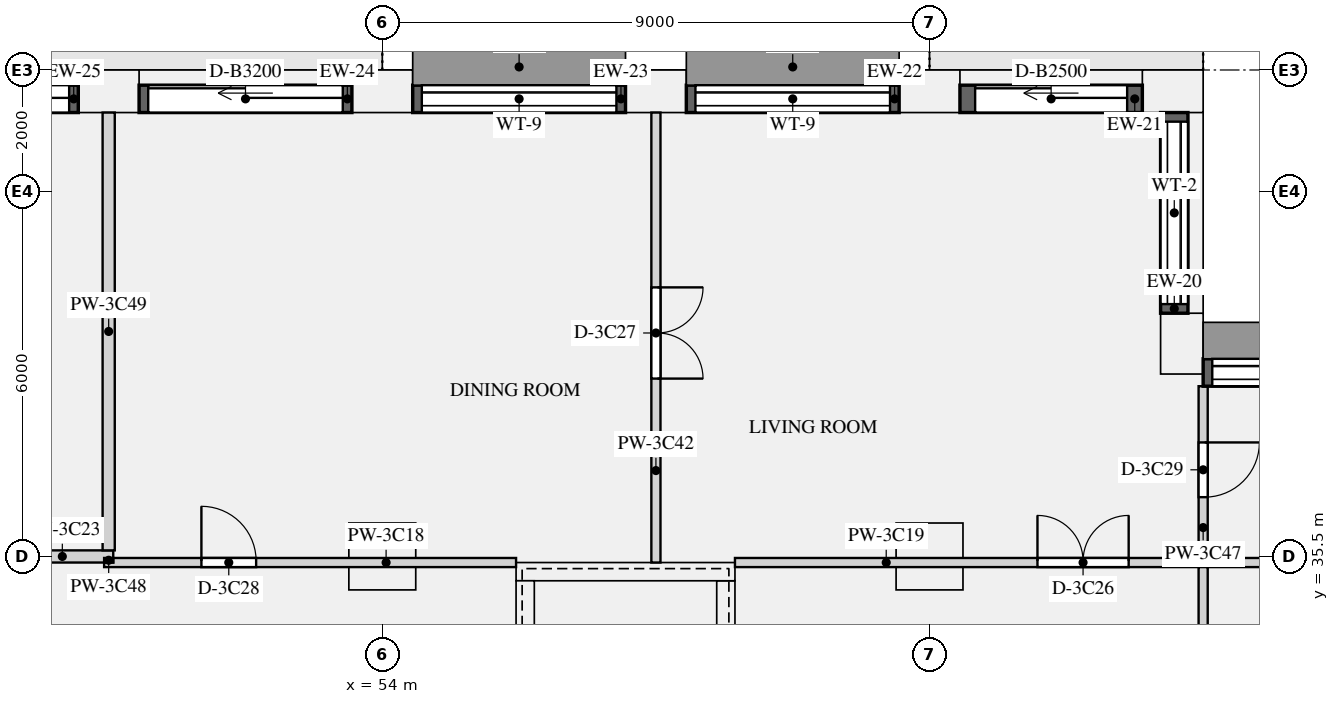
"""IFC4 building model, lengths in metres.
Left out: names, types, materials, properties, quantities, classifications, styles, units other than length and angle.
Written with IfcOpenShell. Run it as: python <this file> out.ifc"""

import sys

from ifc_helpers import new_model, si_unit, direction, frame, frame_2d, origin, origin_2d, place, context, subcontext, project, spatial, rectangle, extrude, element, fill, save


model = new_model("IFC4")
c1 = context("Model", 3, precision=1e-05, world=origin(), true_north=direction((0.0, 1.0)))
c2 = subcontext(c1, "Body", "Model", "MODEL_VIEW")
j1 = project(units=[si_unit("LENGTHUNIT", "METRE"), si_unit("PLANEANGLEUNIT", "RADIAN")], contexts=[c1])
p1 = place(None, origin())
s1 = spatial("IfcSite", under=j1, at=p1, CompositionType="ELEMENT")
p2 = place(p1, origin())
s2 = spatial("IfcBuilding", under=s1, at=p2, CompositionType="ELEMENT")
p3 = place(p2, frame((0.0, 0.0, 160.2)))
s3 = spatial("IfcBuildingStorey", under=s2, at=p3, CompositionType="ELEMENT", Elevation=160.2)
for number, where, z_axis, x_axis in (
    (1, (67.15, 39.0, 0.0), (0.0, 0.0, 1.0), (0.0, 1.0, 0.0)),
    (2, (67.0, 43.15, 0.0), (0.0, 0.0, 1.0), (-1.0, 0.0, 0.0)),
    (3, (63.0, 43.15, 0.0), (0.0, 0.0, 1.0), (-1.0, 0.0, 0.0)),
    (4, (58.5, 43.15, 0.0), (0.0, 0.0, 1.0), (-1.0, 0.0, 0.0)),
    (5, (54.0, 43.15, 0.0), (0.0, 0.0, 1.0), (-1.0, 0.0, 0.0)),
    (6, (49.5, 43.15, 0.0), (0.0, 0.0, 1.0), (-1.0, 0.0, 0.0)),
):
    element("IfcColumn", number, at=place(p3, frame(where, z_axis=z_axis, x_axis=x_axis)), inside=s3, PredefinedType="USERDEFINED", context=c2, shape_type="SweptSolid", body=[
        extrude(rectangle(XDim=1.0, YDim=0.7, at=origin_2d()), origin(), (0.0, 0.0, 1.0), 3.15),
    ])
for number, where, z_axis, x_axis in (
    (7, (54.0, 35.5, 0.0), (0.0, 0.0, 1.0), (1.0, 0.0, 0.0)),
    (8, (63.0, 35.5, 0.0), (0.0, 0.0, 1.0), (1.0, 0.0, 0.0)),
):
    element("IfcColumn", number, at=place(p3, frame(where, z_axis=z_axis, x_axis=x_axis)), inside=s3, PredefinedType="COLUMN", context=c2, shape_type="SweptSolid", body=[
        extrude(rectangle(XDim=1.1, YDim=1.1, at=origin_2d()), origin(), (0.0, 0.0, 1.0), 3.15),
    ])
p4 = place(p3, frame((56.2, 35.25, 0.0), z_axis=(0.0, 0.0, 1.0), x_axis=(1.0, 0.0, 0.0)))
e9 = element("IfcWall", 9, at=p4, inside=s3, PredefinedType="SHEAR", context=c2, shape_type="SweptSolid", body=[
    extrude(rectangle(XDim=3.6, YDim=0.3, at=frame_2d((1.8, 0.0))), origin(), (0.0, 0.0, 1.0), 3.15),
])
for number, where, z_axis, x_axis in (
    (10, (56.35, 27.3, 0.0), (0.0, 0.0, 1.0), (0.0, 1.0, 0.0)),
    (11, (59.65, 27.3, 0.0), (0.0, 0.0, 1.0), (0.0, 1.0, 0.0)),
):
    element("IfcWall", number, at=place(p3, frame(where, z_axis=z_axis, x_axis=x_axis)), inside=s3, PredefinedType="SHEAR", context=c2, shape_type="SweptSolid", body=[
        extrude(rectangle(XDim=7.8, YDim=0.3, at=frame_2d((3.9, 0.0))), origin(), (0.0, 0.0, 1.0), 3.15),
    ])
p5 = place(p3, frame((71.0, 38.525, 0.9), z_axis=(0.0, 0.0, 1.0), x_axis=(-1.0, 0.0, 0.0)))
e12 = element("IfcWall", 12, at=p5, inside=s3, PredefinedType="SOLIDWALL", context=c2, shape_type="SweptSolid", body=[
    extrude(rectangle(XDim=3.5, YDim=0.45, at=frame_2d((1.75, 0.0))), origin(), (0.0, 0.0, 1.0), 1.93),
])
p6 = place(p5, frame((0.15, 0.0, 0.15)))
e13 = element("IfcOpeningElement", 13, at=p6, cuts=e12, PredefinedType="OPENING", context=c2, shape_type="SweptSolid", body=[
    extrude(rectangle(XDim=3.2, YDim=1.5, at=frame_2d((1.6, 0.75))), frame((0.0, 0.235, 0.0), z_axis=(0.0, -1.0, 0.0), x_axis=(1.0, 0.0, 0.0)), (0.0, 0.0, 1.0), 0.47),
])
p7 = place(p3, frame((67.025, 39.5, 0.9), z_axis=(0.0, 0.0, 1.0), x_axis=(0.0, 1.0, 0.0)))
e14 = element("IfcWall", 14, at=p7, inside=s3, PredefinedType="SOLIDWALL", context=c2, shape_type="SweptSolid", body=[
    extrude(rectangle(XDim=3.3, YDim=0.45, at=frame_2d((1.65, 0.0))), origin(), (0.0, 0.0, 1.0), 1.93),
])
p8 = place(p7, frame((0.15, 0.0, 0.15)))
e15 = element("IfcOpeningElement", 15, at=p8, cuts=e14, PredefinedType="OPENING", context=c2, shape_type="SweptSolid", body=[
    extrude(rectangle(XDim=3.0, YDim=1.5, at=frame_2d((1.5, 0.75))), frame((0.0, 0.235, 0.0), z_axis=(0.0, -1.0, 0.0), x_axis=(1.0, 0.0, 0.0)), (0.0, 0.0, 1.0), 0.47),
])
p9 = place(p3, frame((66.5, 43.025, 0.0), z_axis=(0.0, 0.0, 1.0), x_axis=(-1.0, 0.0, 0.0)))
e16 = element("IfcWall", 16, at=p9, inside=s3, PredefinedType="SOLIDWALL", context=c2, shape_type="SweptSolid", body=[
    extrude(rectangle(XDim=3.0, YDim=0.45, at=frame_2d((1.5, 0.0))), origin(), (0.0, 0.0, 1.0), 2.83),
])
p10 = place(p9, frame((0.25, 0.0, 0.0)))
e17 = element("IfcOpeningElement", 17, at=p10, cuts=e16, PredefinedType="OPENING", context=c2, shape_type="SweptSolid", body=[
    extrude(rectangle(XDim=2.5, YDim=2.3, at=frame_2d((1.25, 1.15))), frame((0.0, 0.235, 0.0), z_axis=(0.0, -1.0, 0.0), x_axis=(1.0, 0.0, 0.0)), (0.0, 0.0, 1.0), 0.47),
])
p11 = place(p3, frame((62.5, 43.025, 0.9), z_axis=(0.0, 0.0, 1.0), x_axis=(-1.0, 0.0, 0.0)))
e18 = element("IfcWall", 18, at=p11, inside=s3, PredefinedType="SOLIDWALL", context=c2, shape_type="SweptSolid", body=[
    extrude(rectangle(XDim=3.5, YDim=0.45, at=frame_2d((1.75, 0.0))), origin(), (0.0, 0.0, 1.0), 1.93),
])
p12 = place(p11, frame((0.15, 0.0, 0.15)))
e19 = element("IfcOpeningElement", 19, at=p12, cuts=e18, PredefinedType="OPENING", context=c2, shape_type="SweptSolid", body=[
    extrude(rectangle(XDim=3.2, YDim=1.5, at=frame_2d((1.6, 0.75))), frame((0.0, 0.235, 0.0), z_axis=(0.0, -1.0, 0.0), x_axis=(1.0, 0.0, 0.0)), (0.0, 0.0, 1.0), 0.47),
])
p13 = place(p3, frame((58.0, 43.025, 0.9), z_axis=(0.0, 0.0, 1.0), x_axis=(-1.0, 0.0, 0.0)))
e20 = element("IfcWall", 20, at=p13, inside=s3, PredefinedType="SOLIDWALL", context=c2, shape_type="SweptSolid", body=[
    extrude(rectangle(XDim=3.5, YDim=0.45, at=frame_2d((1.75, 0.0))), origin(), (0.0, 0.0, 1.0), 1.93),
])
p14 = place(p13, frame((0.15, 0.0, 0.15)))
e21 = element("IfcOpeningElement", 21, at=p14, cuts=e20, PredefinedType="OPENING", context=c2, shape_type="SweptSolid", body=[
    extrude(rectangle(XDim=3.2, YDim=1.5, at=frame_2d((1.6, 0.75))), frame((0.0, 0.235, 0.0), z_axis=(0.0, -1.0, 0.0), x_axis=(1.0, 0.0, 0.0)), (0.0, 0.0, 1.0), 0.47),
])
p15 = place(p3, frame((53.5, 43.025, 0.0), z_axis=(0.0, 0.0, 1.0), x_axis=(-1.0, 0.0, 0.0)))
e22 = element("IfcWall", 22, at=p15, inside=s3, PredefinedType="SOLIDWALL", context=c2, shape_type="SweptSolid", body=[
    extrude(rectangle(XDim=3.5, YDim=0.45, at=frame_2d((1.75, 0.0))), origin(), (0.0, 0.0, 1.0), 2.83),
])
p16 = place(p15, frame((0.15, 0.0, 0.0)))
e23 = element("IfcOpeningElement", 23, at=p16, cuts=e22, PredefinedType="OPENING", context=c2, shape_type="SweptSolid", body=[
    extrude(rectangle(XDim=3.2, YDim=2.3, at=frame_2d((1.6, 1.15))), frame((0.0, 0.235, 0.0), z_axis=(0.0, -1.0, 0.0), x_axis=(1.0, 0.0, 0.0)), (0.0, 0.0, 1.0), 0.47),
])
p17 = place(p3, frame((49.0, 43.025, 0.0), z_axis=(0.0, 0.0, 1.0), x_axis=(-1.0, 0.0, 0.0)))
e24 = element("IfcWall", 24, at=p17, inside=s3, PredefinedType="SOLIDWALL", context=c2, shape_type="SweptSolid", body=[
    extrude(rectangle(XDim=3.5, YDim=0.45, at=frame_2d((1.75, 0.0))), origin(), (0.0, 0.0, 1.0), 2.83),
])
p18 = place(p17, frame((0.15, 0.0, 0.0)))
e25 = element("IfcOpeningElement", 25, at=p18, cuts=e24, PredefinedType="OPENING", context=c2, shape_type="SweptSolid", body=[
    extrude(rectangle(XDim=3.2, YDim=2.3, at=frame_2d((1.6, 1.15))), frame((0.0, 0.235, 0.0), z_axis=(0.0, -1.0, 0.0), x_axis=(1.0, 0.0, 0.0)), (0.0, 0.0, 1.0), 0.47),
])
p19 = place(p3, frame((49.425, 35.4, 0.0), z_axis=(0.0, 0.0, 1.0), x_axis=(1.0, 0.0, 0.0)))
e26 = element("IfcWall", 26, at=p19, inside=s3, PredefinedType="PARTITIONING", context=c2, shape_type="SweptSolid", body=[
    extrude(rectangle(XDim=6.775, YDim=0.15, at=frame_2d((3.387, 0.0))), origin(), (0.0, 0.0, 1.0), 2.83),
])
p20 = place(p19, frame((1.6, 0.0, 0.0)))
e27 = element("IfcOpeningElement", 27, at=p20, cuts=e26, PredefinedType="OPENING", context=c2, shape_type="SweptSolid", body=[
    extrude(rectangle(XDim=0.9, YDim=2.1, at=frame_2d((0.45, 1.05))), frame((0.0, 0.085, 0.0), z_axis=(0.0, -1.0, 0.0), x_axis=(1.0, 0.0, 0.0)), (0.0, 0.0, 1.0), 0.17),
])
p21 = place(p3, frame((59.8, 35.4, 0.0), z_axis=(0.0, 0.0, 1.0), x_axis=(1.0, 0.0, 0.0)))
e28 = element("IfcWall", 28, at=p21, inside=s3, PredefinedType="PARTITIONING", context=c2, shape_type="SweptSolid", body=[
    extrude(rectangle(XDim=11.5, YDim=0.15, at=frame_2d((5.75, 0.0))), origin(), (0.0, 0.0, 1.0), 2.83),
])
p22 = place(p21, frame((4.975, 0.0, 0.0)))
e29 = element("IfcOpeningElement", 29, at=p22, cuts=e28, PredefinedType="OPENING", context=c2, shape_type="SweptSolid", body=[
    extrude(rectangle(XDim=1.5, YDim=2.1, at=frame_2d((0.75, 1.05))), frame((0.0, 0.085, 0.0), z_axis=(0.0, -1.0, 0.0), x_axis=(1.0, 0.0, 0.0)), (0.0, 0.0, 1.0), 0.17),
])
p23 = place(p21, frame((9.225, 0.0, 0.0)))
e30 = element("IfcOpeningElement", 30, at=p23, cuts=e28, PredefinedType="OPENING", context=c2, shape_type="SweptSolid", body=[
    extrude(rectangle(XDim=0.9, YDim=2.1, at=frame_2d((0.45, 1.05))), frame((0.0, 0.085, 0.0), z_axis=(0.0, -1.0, 0.0), x_axis=(1.0, 0.0, 0.0)), (0.0, 0.0, 1.0), 0.17),
])
p24 = place(p3, frame((47.9, 35.5, 0.0), z_axis=(0.0, 0.0, 1.0), x_axis=(1.0, 0.0, 0.0)))
e31 = element("IfcWall", 31, at=p24, inside=s3, PredefinedType="PARTITIONING", context=c2, shape_type="SweptSolid", body=[
    extrude(rectangle(XDim=1.675, YDim=0.2, at=frame_2d((0.837, 0.0))), origin(), (0.0, 0.0, 1.0), 2.83),
])
p25 = place(p3, frame((58.5, 35.4, 0.0), z_axis=(0.0, 0.0, 1.0), x_axis=(0.0, 1.0, 0.0)))
e32 = element("IfcWall", 32, at=p25, inside=s3, PredefinedType="PARTITIONING", context=c2, shape_type="SweptSolid", body=[
    extrude(rectangle(XDim=7.4, YDim=0.15, at=frame_2d((3.7, 0.0))), origin(), (0.0, 0.0, 1.0), 2.83),
])
p26 = place(p25, frame((3.025, 0.0, 0.0)))
e33 = element("IfcOpeningElement", 33, at=p26, cuts=e32, PredefinedType="OPENING", context=c2, shape_type="SweptSolid", body=[
    extrude(rectangle(XDim=1.5, YDim=2.1, at=frame_2d((0.75, 1.05))), frame((0.0, 0.085, 0.0), z_axis=(0.0, -1.0, 0.0), x_axis=(1.0, 0.0, 0.0)), (0.0, 0.0, 1.0), 0.17),
])
p27 = place(p3, frame((67.5, 24.575, 0.0), z_axis=(0.0, 0.0, 1.0), x_axis=(0.0, 1.0, 0.0)))
e34 = element("IfcWall", 34, at=p27, inside=s3, PredefinedType="PARTITIONING", context=c2, shape_type="SweptSolid", body=[
    extrude(rectangle(XDim=10.75, YDim=0.15, at=frame_2d((5.375, 0.0))), origin(), (0.0, 0.0, 1.0), 2.83),
])
p28 = place(p27, frame((6.875, 0.0, 0.0)))
e35 = element("IfcOpeningElement", 35, at=p28, cuts=e34, PredefinedType="OPENING", context=c2, shape_type="SweptSolid", body=[
    extrude(rectangle(XDim=1.5, YDim=2.1, at=frame_2d((0.75, 1.05))), frame((0.0, 0.085, 0.0), z_axis=(0.0, -1.0, 0.0), x_axis=(1.0, 0.0, 0.0)), (0.0, 0.0, 1.0), 0.17),
])
p29 = place(p3, frame((67.5, 35.475, 0.0), z_axis=(0.0, 0.0, 1.0), x_axis=(0.0, 1.0, 0.0)))
e36 = element("IfcWall", 36, at=p29, inside=s3, PredefinedType="PARTITIONING", context=c2, shape_type="SweptSolid", body=[
    extrude(rectangle(XDim=2.825, YDim=0.15, at=frame_2d((1.413, 0.0))), origin(), (0.0, 0.0, 1.0), 2.83),
])
p30 = place(p29, frame((1.0, 0.0, 0.0)))
e37 = element("IfcOpeningElement", 37, at=p30, cuts=e36, PredefinedType="OPENING", context=c2, shape_type="SweptSolid", body=[
    extrude(rectangle(XDim=0.9, YDim=2.1, at=frame_2d((0.45, 1.05))), frame((0.0, 0.085, 0.0), z_axis=(0.0, -1.0, 0.0), x_axis=(1.0, 0.0, 0.0)), (0.0, 0.0, 1.0), 0.17),
])
p31 = place(p3, frame((49.5, 35.4, 0.0), z_axis=(0.0, 0.0, 1.0), x_axis=(0.0, 1.0, 0.0)))
e38 = element("IfcWall", 38, at=p31, inside=s3, PredefinedType="PARTITIONING", context=c2, shape_type="SweptSolid", body=[
    extrude(rectangle(XDim=0.075, YDim=0.15, at=frame_2d((0.038, 0.0))), origin(), (0.0, 0.0, 1.0), 2.83),
])
p32 = place(p3, frame((49.5, 35.6, 0.0), z_axis=(0.0, 0.0, 1.0), x_axis=(0.0, 1.0, 0.0)))
e39 = element("IfcWall", 39, at=p32, inside=s3, PredefinedType="PARTITIONING", context=c2, shape_type="SweptSolid", body=[
    extrude(rectangle(XDim=7.2, YDim=0.2, at=frame_2d((3.6, 0.0))), origin(), (0.0, 0.0, 1.0), 2.83),
])
p33 = place(p6, origin())
e40 = element("IfcWindow", 40, at=p33, inside=s3, PartitioningType="SINGLE_PANEL", PredefinedType="WINDOW", context=c2, shape_type="SweptSolid", body=[
    extrude(rectangle(XDim=3.2, YDim=1.5, at=frame_2d((1.6, 0.75))), frame((0.0, -0.065, 0.0), z_axis=(0.0, -1.0, 0.0), x_axis=(1.0, 0.0, 0.0)), (0.0, 0.0, 1.0), 0.06),
])
fill(e13, e40)
p34 = place(p8, origin())
e41 = element("IfcWindow", 41, at=p34, inside=s3, PartitioningType="SINGLE_PANEL", PredefinedType="WINDOW", context=c2, shape_type="SweptSolid", body=[
    extrude(rectangle(XDim=3.0, YDim=1.5, at=frame_2d((1.5, 0.75))), frame((0.0, -0.065, 0.0), z_axis=(0.0, -1.0, 0.0), x_axis=(1.0, 0.0, 0.0)), (0.0, 0.0, 1.0), 0.06),
])
fill(e15, e41)
p35 = place(p10, origin())
e42 = element("IfcDoor", 42, at=p35, inside=s3, OperationType="SLIDING_TO_LEFT", PredefinedType="DOOR", context=c2, shape_type="SweptSolid", body=[
    extrude(rectangle(XDim=2.5, YDim=2.3, at=frame_2d((1.25, 1.15))), frame((0.0, -0.07, 0.0), z_axis=(0.0, -1.0, 0.0), x_axis=(1.0, 0.0, 0.0)), (0.0, 0.0, 1.0), 0.05),
])
fill(e17, e42)
p36 = place(p12, origin())
e43 = element("IfcWindow", 43, at=p36, inside=s3, PartitioningType="SINGLE_PANEL", PredefinedType="WINDOW", context=c2, shape_type="SweptSolid", body=[
    extrude(rectangle(XDim=3.2, YDim=1.5, at=frame_2d((1.6, 0.75))), frame((0.0, -0.065, 0.0), z_axis=(0.0, -1.0, 0.0), x_axis=(1.0, 0.0, 0.0)), (0.0, 0.0, 1.0), 0.06),
])
fill(e19, e43)
p37 = place(p14, origin())
e44 = element("IfcWindow", 44, at=p37, inside=s3, PartitioningType="SINGLE_PANEL", PredefinedType="WINDOW", context=c2, shape_type="SweptSolid", body=[
    extrude(rectangle(XDim=3.2, YDim=1.5, at=frame_2d((1.6, 0.75))), frame((0.0, -0.065, 0.0), z_axis=(0.0, -1.0, 0.0), x_axis=(1.0, 0.0, 0.0)), (0.0, 0.0, 1.0), 0.06),
])
fill(e21, e44)
p38 = place(p16, origin())
e45 = element("IfcDoor", 45, at=p38, inside=s3, OperationType="SLIDING_TO_LEFT", PredefinedType="DOOR", context=c2, shape_type="SweptSolid", body=[
    extrude(rectangle(XDim=3.2, YDim=2.3, at=frame_2d((1.6, 1.15))), frame((0.0, -0.07, 0.0), z_axis=(0.0, -1.0, 0.0), x_axis=(1.0, 0.0, 0.0)), (0.0, 0.0, 1.0), 0.05),
])
fill(e23, e45)
p39 = place(p18, origin())
e46 = element("IfcDoor", 46, at=p39, inside=s3, OperationType="SLIDING_TO_LEFT", PredefinedType="DOOR", context=c2, shape_type="SweptSolid", body=[
    extrude(rectangle(XDim=3.2, YDim=2.3, at=frame_2d((1.6, 1.15))), frame((0.0, -0.07, 0.0), z_axis=(0.0, -1.0, 0.0), x_axis=(1.0, 0.0, 0.0)), (0.0, 0.0, 1.0), 0.05),
])
fill(e25, e46)
p40 = place(p22, origin())
e47 = element("IfcDoor", 47, at=p40, inside=s3, OperationType="DOUBLE_DOOR_SINGLE_SWING", PredefinedType="DOOR", context=c2, shape_type="SweptSolid", body=[
    extrude(rectangle(XDim=1.5, YDim=2.1, at=frame_2d((0.75, 1.05))), frame((0.0, 0.025, 0.0), z_axis=(0.0, -1.0, 0.0), x_axis=(1.0, 0.0, 0.0)), (0.0, 0.0, 1.0), 0.05),
])
fill(e29, e47)
p41 = place(p26, frame((1.5, 0.0, 0.0), z_axis=(0.0, 0.0, 1.0), x_axis=(-1.0, 0.0, 0.0)))
e48 = element("IfcDoor", 48, at=p41, inside=s3, OperationType="DOUBLE_DOOR_SINGLE_SWING", PredefinedType="DOOR", context=c2, shape_type="SweptSolid", body=[
    extrude(rectangle(XDim=1.5, YDim=2.1, at=frame_2d((0.75, 1.05))), frame((0.0, 0.025, 0.0), z_axis=(0.0, -1.0, 0.0), x_axis=(1.0, 0.0, 0.0)), (0.0, 0.0, 1.0), 0.05),
])
fill(e33, e48)
p42 = place(p20, origin())
e49 = element("IfcDoor", 49, at=p42, inside=s3, OperationType="SINGLE_SWING_LEFT", PredefinedType="DOOR", context=c2, shape_type="SweptSolid", body=[
    extrude(rectangle(XDim=0.9, YDim=2.1, at=frame_2d((0.45, 1.05))), frame((0.0, 0.025, 0.0), z_axis=(0.0, -1.0, 0.0), x_axis=(1.0, 0.0, 0.0)), (0.0, 0.0, 1.0), 0.05),
])
fill(e27, e49)
p43 = place(p30, frame((0.9, 0.0, 0.0), z_axis=(0.0, 0.0, 1.0), x_axis=(-1.0, 0.0, 0.0)))
e50 = element("IfcDoor", 50, at=p43, inside=s3, OperationType="SINGLE_SWING_LEFT", PredefinedType="DOOR", context=c2, shape_type="SweptSolid", body=[
    extrude(rectangle(XDim=0.9, YDim=2.1, at=frame_2d((0.45, 1.05))), frame((0.0, 0.025, 0.0), z_axis=(0.0, -1.0, 0.0), x_axis=(1.0, 0.0, 0.0)), (0.0, 0.0, 1.0), 0.05),
])
fill(e37, e50)
save(model, sys.argv[1])
